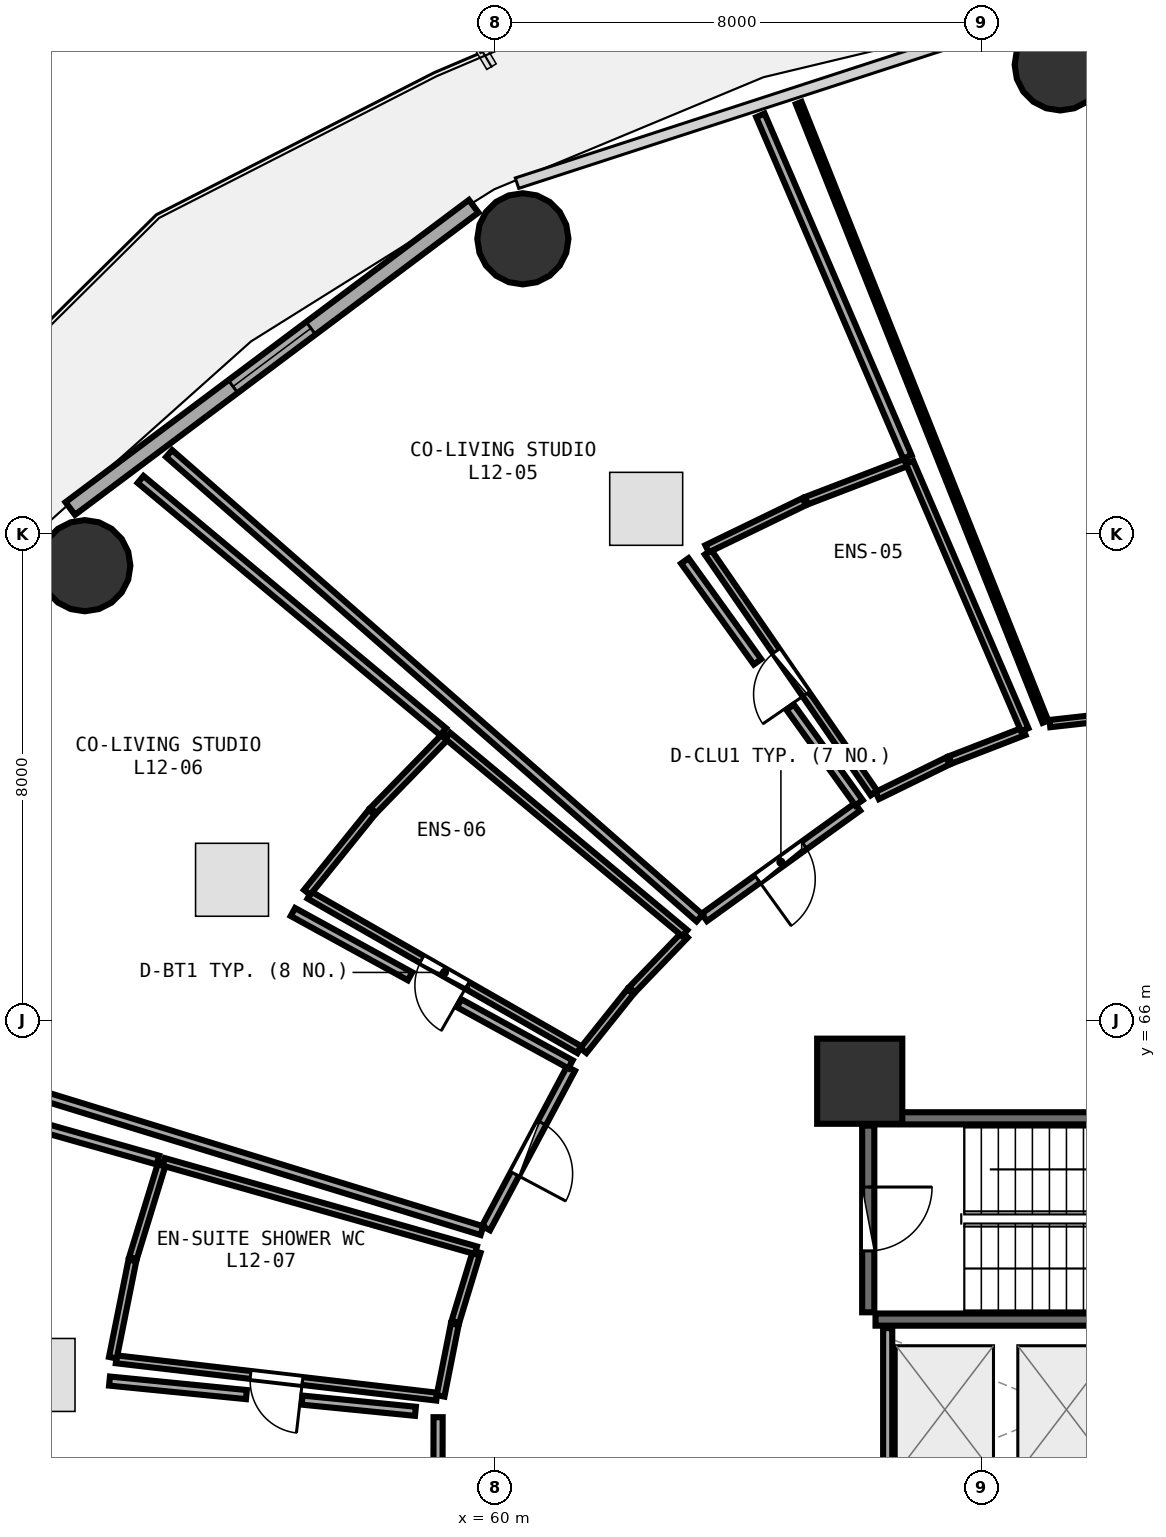
"""IFC4 building model, lengths in metres.
Left out: names, types, materials, properties, quantities, classifications, styles, units other than length and angle.
Written with IfcOpenShell. Run it as: python <this file> out.ifc"""

import sys

from ifc_helpers import new_model, si_unit, direction, frame, frame_2d, origin, origin_2d, place, context, subcontext, project, spatial, rectangle, circle, extrude, element, fill, save


model = new_model("IFC4")
c1 = context("Model", 3, precision=1e-05, world=origin(), true_north=direction((0.0, 1.0)))
c2 = subcontext(c1, "Body", "Model", "MODEL_VIEW")
j1 = project(units=[si_unit("LENGTHUNIT", "METRE"), si_unit("PLANEANGLEUNIT", "RADIAN")], contexts=[c1])
p1 = place(None, origin())
s1 = spatial("IfcSite", under=j1, at=p1, CompositionType="ELEMENT")
p2 = place(p1, origin())
s2 = spatial("IfcBuilding", under=s1, at=p2, CompositionType="ELEMENT")
p3 = place(p2, frame((0.0, 0.0, 48.75)))
s3 = spatial("IfcBuildingStorey", under=s2, at=p3, CompositionType="ELEMENT", Elevation=48.75)
p4 = place(p3, frame((66.0, 65.0, 0.0), z_axis=(0.0, 0.0, 1.0), x_axis=(1.0, 0.0, 0.0)))
e1 = element("IfcColumn", 1, at=p4, inside=s3, PredefinedType="PILASTER", context=c2, shape_type="SweptSolid", body=[
    extrude(rectangle(XDim=1.4, YDim=1.4, at=origin_2d()), origin(), (0.0, 0.0, 1.0), 3.75),
])
for number, where, z_axis, x_axis in (
    (2, (69.298, 81.714, 0.0), (0.0, 0.0, 1.0), (1.0, 0.0, 0.0)),
    (3, (60.46, 78.854, 0.0), (0.0, 0.0, 1.0), (1.0, 0.0, 0.0)),
    (4, (53.256, 73.478, 0.0), (0.0, 0.0, 1.0), (1.0, 0.0, 0.0)),
):
    element("IfcColumn", number, at=place(p3, frame(where, z_axis=z_axis, x_axis=x_axis)), inside=s3, PredefinedType="COLUMN", context=c2, shape_type="SweptSolid", body=[
        extrude(circle(Radius=0.75, at=origin_2d()), origin(), (0.0, 0.0, 1.0), 3.75),
    ])
p5 = place(p3, frame((59.651, 79.389, 0.0), z_axis=(0.0, 0.0, 1.0), x_axis=(-0.80030733173, -0.599590005569, 0.0)))
e5 = element("IfcWall", 5, at=p5, inside=s3, PredefinedType="SOLIDWALL", context=c2, shape_type="SweptSolid", body=[
    extrude(rectangle(XDim=8.291, YDim=0.26, at=frame_2d((4.145, 0.0))), origin(), (0.0, 0.0, 1.0), 3.475),
])
p6 = place(p5, frame((3.345, 0.0, 0.85)))
e6 = element("IfcOpeningElement", 6, at=p6, cuts=e5, PredefinedType="OPENING", context=c2, shape_type="SweptSolid", body=[
    extrude(rectangle(XDim=1.6, YDim=1.45, at=frame_2d((0.8, 0.725))), frame((0.0, 0.14, 0.0), z_axis=(0.0, -1.0, 0.0), x_axis=(1.0, 0.0, 0.0)), (0.0, 0.0, 1.0), 0.28),
])
for number, where, z_axis, x_axis in (
    (7, (66.26, 61.08, 0.0), (0.0, 0.0, 1.0), (1.0, 0.0, 0.0)),
    (8, (73.42, 64.39, 0.0), (0.0, 0.0, 1.0), (-1.0, 0.0, 0.0)),
):
    element("IfcWall", number, at=place(p3, frame(where, z_axis=z_axis, x_axis=x_axis)), inside=s3, PredefinedType="SHEAR", context=c2, shape_type="SweptSolid", body=[
        extrude(rectangle(XDim=7.16, YDim=0.2, at=frame_2d((3.58, 0.0))), origin(), (0.0, 0.0, 1.0), 3.49),
    ])
p7 = place(p3, frame((66.14, 64.27, 0.0), z_axis=(0.0, 0.0, 1.0), x_axis=(0.0, -1.0, 0.0)))
e9 = element("IfcWall", 9, at=p7, inside=s3, PredefinedType="SHEAR", context=c2, shape_type="SweptSolid", body=[
    extrude(rectangle(XDim=3.07, YDim=0.2, at=frame_2d((1.535, 0.0))), origin(), (0.0, 0.0, 1.0), 3.49),
])
p8 = place(p7, frame((1.01, 0.0, 0.0)))
e10 = element("IfcOpeningElement", 10, at=p8, cuts=e9, PredefinedType="OPENING", context=c2, shape_type="SweptSolid", body=[
    extrude(rectangle(XDim=1.05, YDim=2.1, at=frame_2d((0.525, 1.05))), frame((0.0, 0.11, 0.0), z_axis=(0.0, -1.0, 0.0), x_axis=(1.0, 0.0, 0.0)), (0.0, 0.0, 1.0), 0.22),
])
p9 = place(p3, frame((66.46, 58.48, 0.0), z_axis=(0.0, 0.0, 1.0), x_axis=(0.0, 1.0, 0.0)))
e11 = element("IfcWall", 11, at=p9, inside=s3, PredefinedType="PARTITIONING", context=c2, shape_type="SweptSolid", body=[
    extrude(rectangle(XDim=2.46, YDim=0.15, at=frame_2d((1.23, 0.0))), origin(), (0.0, 0.0, 1.0), 3.48),
])
p10 = place(p3, frame((75.292, 71.568, 0.0), z_axis=(0.0, 0.0, 1.0), x_axis=(-0.993850084324, -0.110733959964, 0.0)))
e12 = element("IfcWall", 12, at=p10, inside=s3, PredefinedType="PARTITIONING", context=c2, shape_type="SweptSolid", body=[
    extrude(rectangle(XDim=6.202, YDim=0.12, at=frame_2d((3.101, 0.0))), origin(), (0.0, 0.0, 1.0), 2.875),
])
p11 = place(p10, frame((2.651, 0.0, 0.0)))
e13 = element("IfcOpeningElement", 13, at=p11, cuts=e12, PredefinedType="OPENING", context=c2, shape_type="SweptSolid", body=[
    extrude(rectangle(XDim=0.9, YDim=2.08, at=frame_2d((0.45, 1.04))), frame((0.0, 0.07, 0.0), z_axis=(0.0, -1.0, 0.0), x_axis=(1.0, 0.0, 0.0)), (0.0, 0.0, 1.0), 0.14),
])
p12 = place(p3, frame((66.235, 69.738, 0.0), z_axis=(0.0, 0.0, 1.0), x_axis=(-0.567426867042, 0.823423797664, 0.0)))
e14 = element("IfcWall", 14, at=p12, inside=s3, PredefinedType="PLUMBINGWALL", context=c2, shape_type="SweptSolid", body=[
    extrude(rectangle(XDim=4.809, YDim=0.13, at=frame_2d((2.405, 0.0))), origin(), (0.0, 0.0, 1.0), 3.175),
])
p13 = place(p12, frame((1.975, 0.0, 0.0)))
e15 = element("IfcOpeningElement", 15, at=p13, cuts=e14, PredefinedType="OPENING", context=c2, shape_type="SweptSolid", body=[
    extrude(rectangle(XDim=0.86, YDim=2.05, at=frame_2d((0.43, 1.025))), frame((0.0, 0.075, 0.0), z_axis=(0.0, -1.0, 0.0), x_axis=(1.0, 0.0, 0.0)), (0.0, 0.0, 1.0), 0.15),
])
p14 = place(p3, frame((65.963, 69.511, 0.0), z_axis=(0.0, 0.0, 1.0), x_axis=(-0.811021116066, -0.585016879496, 0.0)))
e16 = element("IfcWall", 16, at=p14, inside=s3, PredefinedType="PARTITIONING", context=c2, shape_type="SweptSolid", body=[
    extrude(rectangle(XDim=3.106, YDim=0.15, at=frame_2d((1.553, 0.0))), origin(), (0.0, 0.0, 1.0), 2.875),
])
p15 = place(p14, frame((1.078, 0.0, 0.0)))
e17 = element("IfcOpeningElement", 17, at=p15, cuts=e16, PredefinedType="OPENING", context=c2, shape_type="SweptSolid", body=[
    extrude(rectangle(XDim=0.95, YDim=2.08, at=frame_2d((0.475, 1.04))), frame((0.0, 0.085, 0.0), z_axis=(0.0, -1.0, 0.0), x_axis=(1.0, 0.0, 0.0)), (0.0, 0.0, 1.0), 0.17),
])
p16 = place(p3, frame((61.39, 65.519, 0.0), z_axis=(0.0, 0.0, 1.0), x_axis=(-0.867813964862, 0.496889245598, 0.0)))
e18 = element("IfcWall", 18, at=p16, inside=s3, PredefinedType="PLUMBINGWALL", context=c2, shape_type="SweptSolid", body=[
    extrude(rectangle(XDim=5.115, YDim=0.13, at=frame_2d((2.557, 0.0))), origin(), (0.0, 0.0, 1.0), 2.875),
])
p17 = place(p16, frame((2.127, 0.0, 0.0)))
e19 = element("IfcOpeningElement", 19, at=p17, cuts=e18, PredefinedType="OPENING", context=c2, shape_type="SweptSolid", body=[
    extrude(rectangle(XDim=0.86, YDim=2.05, at=frame_2d((0.43, 1.025))), frame((0.0, 0.075, 0.0), z_axis=(0.0, -1.0, 0.0), x_axis=(1.0, 0.0, 0.0)), (0.0, 0.0, 1.0), 0.15),
])
p18 = place(p3, frame((61.251, 65.206, 0.0), z_axis=(0.0, 0.0, 1.0), x_axis=(-0.470332327533, -0.882489377657, 0.0)))
e20 = element("IfcWall", 20, at=p18, inside=s3, PredefinedType="PARTITIONING", context=c2, shape_type="SweptSolid", body=[
    extrude(rectangle(XDim=2.971, YDim=0.15, at=frame_2d((1.486, 0.0))), origin(), (0.0, 0.0, 1.0), 2.875),
])
p19 = place(p18, frame((1.011, 0.0, 0.0)))
e21 = element("IfcOpeningElement", 21, at=p19, cuts=e20, PredefinedType="OPENING", context=c2, shape_type="SweptSolid", body=[
    extrude(rectangle(XDim=0.95, YDim=2.08, at=frame_2d((0.475, 1.04))), frame((0.0, 0.085, 0.0), z_axis=(0.0, -1.0, 0.0), x_axis=(1.0, 0.0, 0.0)), (0.0, 0.0, 1.0), 0.17),
])
p20 = place(p3, frame((59.043, 59.813, 0.0), z_axis=(0.0, 0.0, 1.0), x_axis=(-0.99328280677, 0.115711994952, 0.0)))
e22 = element("IfcWall", 22, at=p20, inside=s3, PredefinedType="PLUMBINGWALL", context=c2, shape_type="SweptSolid", body=[
    extrude(rectangle(XDim=5.306, YDim=0.13, at=frame_2d((2.653, 0.0))), origin(), (0.0, 0.0, 1.0), 3.175),
])
p21 = place(p20, frame((2.223, 0.0, 0.0)))
e23 = element("IfcOpeningElement", 23, at=p21, cuts=e22, PredefinedType="OPENING", context=c2, shape_type="SweptSolid", body=[
    extrude(rectangle(XDim=0.86, YDim=2.05, at=frame_2d((0.43, 1.025))), frame((0.0, 0.075, 0.0), z_axis=(0.0, -1.0, 0.0), x_axis=(1.0, 0.0, 0.0)), (0.0, 0.0, 1.0), 0.15),
])
p22 = place(p3, frame((59.066, 59.475, 0.0), z_axis=(0.0, 0.0, 1.0), x_axis=(-0.001677287141, -0.999998593353, 0.0)))
e24 = element("IfcWall", 24, at=p22, inside=s3, PredefinedType="PARTITIONING", context=c2, shape_type="SweptSolid", body=[
    extrude(rectangle(XDim=2.911, YDim=0.15, at=frame_2d((1.456, 0.0))), origin(), (0.0, 0.0, 1.0), 2.875),
])
p23 = place(p22, frame((0.981, 0.0, 0.0)))
e25 = element("IfcOpeningElement", 25, at=p23, cuts=e24, PredefinedType="OPENING", context=c2, shape_type="SweptSolid", body=[
    extrude(rectangle(XDim=0.95, YDim=2.08, at=frame_2d((0.475, 1.04))), frame((0.0, 0.085, 0.0), z_axis=(0.0, -1.0, 0.0), x_axis=(1.0, 0.0, 0.0)), (0.0, 0.0, 1.0), 0.17),
])
p24 = place(p3, frame((69.053, 70.912, 0.0), z_axis=(0.0, 0.0, 1.0), x_axis=(-0.370325956987, 0.928901870803, 0.0)))
e26 = element("IfcWall", 26, at=p24, inside=s3, PredefinedType="PARTITIONING", context=c2, shape_type="SweptSolid", body=[
    extrude(rectangle(XDim=10.954, YDim=0.1, at=frame_2d((5.477, 0.0))), origin(), (0.0, 0.0, 1.0), 2.875),
])
p25 = place(p3, frame((68.703, 70.755, 0.0), z_axis=(0.0, 0.0, 1.0), x_axis=(-0.932299479839, -0.361687268082, 0.0)))
e27 = element("IfcWall", 27, at=p25, inside=s3, PredefinedType="PLUMBINGWALL", context=c2, shape_type="SweptSolid", body=[
    extrude(rectangle(XDim=1.304, YDim=0.13, at=frame_2d((0.652, 0.0))), origin(), (0.0, 0.0, 1.0), 3.48),
])
p26 = place(p3, frame((67.451, 70.267, 0.0), z_axis=(0.0, 0.0, 1.0), x_axis=(-0.898275282077, -0.439433177639, 0.0)))
e28 = element("IfcWall", 28, at=p26, inside=s3, PredefinedType="PLUMBINGWALL", context=c2, shape_type="SweptSolid", body=[
    extrude(rectangle(XDim=1.296, YDim=0.13, at=frame_2d((0.648, 0.0))), origin(), (0.0, 0.0, 1.0), 3.48),
])
p27 = place(p3, frame((63.49, 73.757, 0.0), z_axis=(0.0, 0.0, 1.0), x_axis=(0.899832096889, 0.436236400829, 0.0)))
e29 = element("IfcWall", 29, at=p27, inside=s3, PredefinedType="PLUMBINGWALL", context=c2, shape_type="SweptSolid", body=[
    extrude(rectangle(XDim=1.776, YDim=0.13, at=frame_2d((0.888, 0.0))), origin(), (0.0, 0.0, 1.0), 3.48),
])
p28 = place(p3, frame((65.125, 74.547, 0.0), z_axis=(0.0, 0.0, 1.0), x_axis=(0.93361980904, 0.35826533766, 0.0)))
e30 = element("IfcWall", 30, at=p28, inside=s3, PredefinedType="PLUMBINGWALL", context=c2, shape_type="SweptSolid", body=[
    extrude(rectangle(XDim=1.788, YDim=0.13, at=frame_2d((0.894, 0.0))), origin(), (0.0, 0.0, 1.0), 3.48),
])
p29 = place(p3, frame((66.821, 75.177, 0.0), z_axis=(0.0, 0.0, 1.0), x_axis=(0.395562338017, -0.918439130668, 0.0)))
e31 = element("IfcWall", 31, at=p29, inside=s3, PredefinedType="PLUMBINGWALL", context=c2, shape_type="SweptSolid", body=[
    extrude(rectangle(XDim=4.786, YDim=0.13, at=frame_2d((2.393, 0.0))), origin(), (0.0, 0.0, 1.0), 3.175),
])
p30 = place(p3, frame((63.366, 67.685, 0.0), z_axis=(0.0, 0.0, 1.0), x_axis=(-0.752403187404, 0.658702849231, 0.0)))
e32 = element("IfcWall", 32, at=p30, inside=s3, PredefinedType="PARTITIONING", context=c2, shape_type="SweptSolid", body=[
    extrude(rectangle(XDim=11.595, YDim=0.15, at=frame_2d((5.797, 0.0))), origin(), (0.0, 0.0, 1.0), 2.875),
])
p31 = place(p3, frame((64.367, 80.884, 0.0), z_axis=(0.0, 0.0, 1.0), x_axis=(0.395282873179, -0.918559442917, 0.0)))
e33 = element("IfcWall", 33, at=p31, inside=s3, PredefinedType="PARTITIONING", context=c2, shape_type="SweptSolid", body=[
    extrude(rectangle(XDim=6.113, YDim=0.15, at=frame_2d((3.057, 0.0))), origin(), (0.0, 0.0, 1.0), 2.875),
])
p32 = place(p3, frame((63.123, 73.558, 0.0), z_axis=(0.0, 0.0, 1.0), x_axis=(0.58432672942, -0.811518498425, 0.0)))
e34 = element("IfcWall", 34, at=p32, inside=s3, PredefinedType="PARTITIONING", context=c2, shape_type="SweptSolid", body=[
    extrude(rectangle(XDim=2.046, YDim=0.15, at=frame_2d((1.023, 0.0))), origin(), (0.0, 0.0, 1.0), 3.175),
])
p33 = place(p3, frame((64.857, 71.151, 0.0), z_axis=(0.0, 0.0, 1.0), x_axis=(0.584298085417, -0.811539122519, 0.0)))
e35 = element("IfcWall", 35, at=p33, inside=s3, PredefinedType="PARTITIONING", context=c2, shape_type="SweptSolid", body=[
    extrude(rectangle(XDim=1.937, YDim=0.15, at=frame_2d((0.969, 0.0))), origin(), (0.0, 0.0, 1.0), 3.235),
])
p34 = place(p3, frame((63.125, 67.408, 0.0), z_axis=(0.0, 0.0, 1.0), x_axis=(-0.693342211096, -0.720608477824, 0.0)))
e36 = element("IfcWall", 36, at=p34, inside=s3, PredefinedType="PLUMBINGWALL", context=c2, shape_type="SweptSolid", body=[
    extrude(rectangle(XDim=1.254, YDim=0.13, at=frame_2d((0.627, 0.0))), origin(), (0.0, 0.0, 1.0), 2.875),
])
p35 = place(p3, frame((62.229, 66.474, 0.0), z_axis=(0.0, 0.0, 1.0), x_axis=(-0.624263214868, -0.781214079854, 0.0)))
e37 = element("IfcWall", 37, at=p35, inside=s3, PredefinedType="PLUMBINGWALL", context=c2, shape_type="SweptSolid", body=[
    extrude(rectangle(XDim=1.241, YDim=0.13, at=frame_2d((0.621, 0.0))), origin(), (0.0, 0.0, 1.0), 2.875),
])
p36 = place(p3, frame((56.912, 68.106, 0.0), z_axis=(0.0, 0.0, 1.0), x_axis=(0.628152519701, 0.778090233837, 0.0)))
e38 = element("IfcWall", 38, at=p36, inside=s3, PredefinedType="PLUMBINGWALL", context=c2, shape_type="SweptSolid", body=[
    extrude(rectangle(XDim=1.693, YDim=0.13, at=frame_2d((0.847, 0.0))), origin(), (0.0, 0.0, 1.0), 3.175),
])
p37 = place(p3, frame((58.002, 69.453, 0.0), z_axis=(0.0, 0.0, 1.0), x_axis=(0.697337129747, 0.716743278641, 0.0)))
e39 = element("IfcWall", 39, at=p37, inside=s3, PredefinedType="PLUMBINGWALL", context=c2, shape_type="SweptSolid", body=[
    extrude(rectangle(XDim=1.711, YDim=0.13, at=frame_2d((0.855, 0.0))), origin(), (0.0, 0.0, 1.0), 2.875),
])
p38 = place(p3, frame((59.224, 70.681, 0.0), z_axis=(0.0, 0.0, 1.0), x_axis=(0.768509127281, -0.63983882446, 0.0)))
e40 = element("IfcWall", 40, at=p38, inside=s3, PredefinedType="PLUMBINGWALL", context=c2, shape_type="SweptSolid", body=[
    extrude(rectangle(XDim=5.074, YDim=0.13, at=frame_2d((2.537, 0.0))), origin(), (0.0, 0.0, 1.0), 3.175),
])
p39 = place(p3, frame((59.787, 62.543, 0.0), z_axis=(0.0, 0.0, 1.0), x_axis=(-0.955941269752, 0.29355798198, 0.0)))
e41 = element("IfcWall", 41, at=p39, inside=s3, PredefinedType="PARTITIONING", context=c2, shape_type="SweptSolid", body=[
    extrude(rectangle(XDim=11.083, YDim=0.15, at=frame_2d((5.542, 0.0))), origin(), (0.0, 0.0, 1.0), 3.175),
])
p40 = place(p3, frame((54.173, 74.896, 0.0), z_axis=(0.0, 0.0, 1.0), x_axis=(0.768100814479, -0.640328930157, 0.0)))
e42 = element("IfcWall", 42, at=p40, inside=s3, PredefinedType="PARTITIONING", context=c2, shape_type="SweptSolid", body=[
    extrude(rectangle(XDim=6.479, YDim=0.15, at=frame_2d((3.24, 0.0))), origin(), (0.0, 0.0, 1.0), 2.875),
])
p41 = place(p3, frame((56.678, 67.783, 0.0), z_axis=(0.0, 0.0, 1.0), x_axis=(0.876780673324, -0.480890477017, 0.0)))
e43 = element("IfcWall", 43, at=p41, inside=s3, PredefinedType="PARTITIONING", context=c2, shape_type="SweptSolid", body=[
    extrude(rectangle(XDim=2.197, YDim=0.15, at=frame_2d((1.099, 0.0))), origin(), (0.0, 0.0, 1.0), 3.175),
])
p42 = place(p3, frame((59.411, 66.283, 0.0), z_axis=(0.0, 0.0, 1.0), x_axis=(0.876772690424, -0.480905031505, 0.0)))
e44 = element("IfcWall", 44, at=p42, inside=s3, PredefinedType="PARTITIONING", context=c2, shape_type="SweptSolid", body=[
    extrude(rectangle(XDim=2.09, YDim=0.15, at=frame_2d((1.045, 0.0))), origin(), (0.0, 0.0, 1.0), 2.875),
])
p43 = place(p3, frame((59.701, 62.196, 0.0), z_axis=(0.0, 0.0, 1.0), x_axis=(-0.29128243511, -0.956637100993, 0.0)))
e45 = element("IfcWall", 45, at=p43, inside=s3, PredefinedType="PLUMBINGWALL", context=c2, shape_type="SweptSolid", body=[
    extrude(rectangle(XDim=1.206, YDim=0.13, at=frame_2d((0.603, 0.0))), origin(), (0.0, 0.0, 1.0), 3.48),
])
p44 = place(p3, frame((59.34, 61.003, 0.0), z_axis=(0.0, 0.0, 1.0), x_axis=(-0.194199574792, -0.980962040627, 0.0)))
e46 = element("IfcWall", 46, at=p44, inside=s3, PredefinedType="PLUMBINGWALL", context=c2, shape_type="SweptSolid", body=[
    extrude(rectangle(XDim=1.201, YDim=0.13, at=frame_2d((0.6, 0.0))), origin(), (0.0, 0.0, 1.0), 3.48),
])
p45 = place(p3, frame((53.717, 60.454, 0.0), z_axis=(0.0, 0.0, 1.0), x_axis=(0.196892919049, 0.98042499888, 0.0)))
e47 = element("IfcWall", 47, at=p45, inside=s3, PredefinedType="PLUMBINGWALL", context=c2, shape_type="SweptSolid", body=[
    extrude(rectangle(XDim=1.632, YDim=0.13, at=frame_2d((0.816, 0.0))), origin(), (0.0, 0.0, 1.0), 3.48),
])
p46 = place(p3, frame((54.048, 62.092, 0.0), z_axis=(0.0, 0.0, 1.0), x_axis=(0.293405839872, 0.955987977502, 0.0)))
e48 = element("IfcWall", 48, at=p46, inside=s3, PredefinedType="PLUMBINGWALL", context=c2, shape_type="SweptSolid", body=[
    extrude(rectangle(XDim=1.64, YDim=0.13, at=frame_2d((0.82, 0.0))), origin(), (0.0, 0.0, 1.0), 3.48),
])
p47 = place(p3, frame((54.554, 63.674, 0.0), z_axis=(0.0, 0.0, 1.0), x_axis=(0.962194506937, -0.272363233238, 0.0)))
e49 = element("IfcWall", 49, at=p47, inside=s3, PredefinedType="PLUMBINGWALL", context=c2, shape_type="SweptSolid", body=[
    extrude(rectangle(XDim=5.335, YDim=0.13, at=frame_2d((2.667, 0.0))), origin(), (0.0, 0.0, 1.0), 3.175),
])
p48 = place(p3, frame((47.906, 65.56, 0.0), z_axis=(0.0, 0.0, 1.0), x_axis=(0.962107451281, -0.272670592821, 0.0)))
e50 = element("IfcWall", 50, at=p48, inside=s3, PredefinedType="PARTITIONING", context=c2, shape_type="SweptSolid", body=[
    extrude(rectangle(XDim=6.811, YDim=0.15, at=frame_2d((3.406, 0.0))), origin(), (0.0, 0.0, 1.0), 2.875),
])
p49 = place(p3, frame((53.662, 60.069, 0.0), z_axis=(0.0, 0.0, 1.0), x_axis=(0.995156134458, -0.098307009162, 0.0)))
e51 = element("IfcWall", 51, at=p49, inside=s3, PredefinedType="PARTITIONING", context=c2, shape_type="SweptSolid", body=[
    extrude(rectangle(XDim=2.262, YDim=0.15, at=frame_2d((1.131, 0.0))), origin(), (0.0, 0.0, 1.0), 3.175),
])
p50 = place(p3, frame((56.829, 59.756, 0.0), z_axis=(0.0, 0.0, 1.0), x_axis=(0.995148801126, -0.098381215772, 0.0)))
e52 = element("IfcWall", 52, at=p50, inside=s3, PredefinedType="PARTITIONING", context=c2, shape_type="SweptSolid", body=[
    extrude(rectangle(XDim=1.874, YDim=0.15, at=frame_2d((0.937, 0.0))), origin(), (0.0, 0.0, 1.0), 3.48),
])
p51 = place(p6, origin())
e53 = element("IfcWindow", 53, at=p51, inside=s3, PartitioningType="SINGLE_PANEL", PredefinedType="WINDOW", context=c2, shape_type="SweptSolid", body=[
    extrude(rectangle(XDim=1.6, YDim=1.45, at=frame_2d((0.8, 0.725))), frame((0.0, 0.03, 0.0), z_axis=(0.0, -1.0, 0.0), x_axis=(1.0, 0.0, 0.0)), (0.0, 0.0, 1.0), 0.06),
])
fill(e6, e53)
p52 = place(p8, origin())
e54 = element("IfcDoor", 54, at=p52, inside=s3, OperationType="SINGLE_SWING_LEFT", PredefinedType="DOOR", context=c2, shape_type="SweptSolid", body=[
    extrude(rectangle(XDim=1.05, YDim=2.1, at=frame_2d((0.525, 1.05))), frame((0.0, 0.025, 0.0), z_axis=(0.0, -1.0, 0.0), x_axis=(1.0, 0.0, 0.0)), (0.0, 0.0, 1.0), 0.05),
])
fill(e10, e54)
p53 = place(p13, origin())
e55 = element("IfcDoor", 55, at=p53, inside=s3, OperationType="SINGLE_SWING_LEFT", PredefinedType="DOOR", context=c2, shape_type="SweptSolid", body=[
    extrude(rectangle(XDim=0.86, YDim=2.05, at=frame_2d((0.43, 1.025))), frame((0.0, 0.025, 0.0), z_axis=(0.0, -1.0, 0.0), x_axis=(1.0, 0.0, 0.0)), (0.0, 0.0, 1.0), 0.05),
])
fill(e15, e55)
p54 = place(p15, origin())
e56 = element("IfcDoor", 56, at=p54, inside=s3, OperationType="SINGLE_SWING_RIGHT", PredefinedType="DOOR", context=c2, shape_type="SweptSolid", body=[
    extrude(rectangle(XDim=0.95, YDim=2.08, at=frame_2d((0.475, 1.04))), frame((0.0, 0.025, 0.0), z_axis=(0.0, -1.0, 0.0), x_axis=(1.0, 0.0, 0.0)), (0.0, 0.0, 1.0), 0.05),
])
fill(e17, e56)
p55 = place(p17, origin())
e57 = element("IfcDoor", 57, at=p55, inside=s3, OperationType="SINGLE_SWING_LEFT", PredefinedType="DOOR", context=c2, shape_type="SweptSolid", body=[
    extrude(rectangle(XDim=0.86, YDim=2.05, at=frame_2d((0.43, 1.025))), frame((0.0, 0.025, 0.0), z_axis=(0.0, -1.0, 0.0), x_axis=(1.0, 0.0, 0.0)), (0.0, 0.0, 1.0), 0.05),
])
fill(e19, e57)
p56 = place(p19, origin())
e58 = element("IfcDoor", 58, at=p56, inside=s3, OperationType="SINGLE_SWING_RIGHT", PredefinedType="DOOR", context=c2, shape_type="SweptSolid", body=[
    extrude(rectangle(XDim=0.95, YDim=2.08, at=frame_2d((0.475, 1.04))), frame((0.0, 0.025, 0.0), z_axis=(0.0, -1.0, 0.0), x_axis=(1.0, 0.0, 0.0)), (0.0, 0.0, 1.0), 0.05),
])
fill(e21, e58)
p57 = place(p21, origin())
e59 = element("IfcDoor", 59, at=p57, inside=s3, OperationType="SINGLE_SWING_LEFT", PredefinedType="DOOR", context=c2, shape_type="SweptSolid", body=[
    extrude(rectangle(XDim=0.86, YDim=2.05, at=frame_2d((0.43, 1.025))), frame((0.0, 0.025, 0.0), z_axis=(0.0, -1.0, 0.0), x_axis=(1.0, 0.0, 0.0)), (0.0, 0.0, 1.0), 0.05),
])
fill(e23, e59)
save(model, sys.argv[1])
